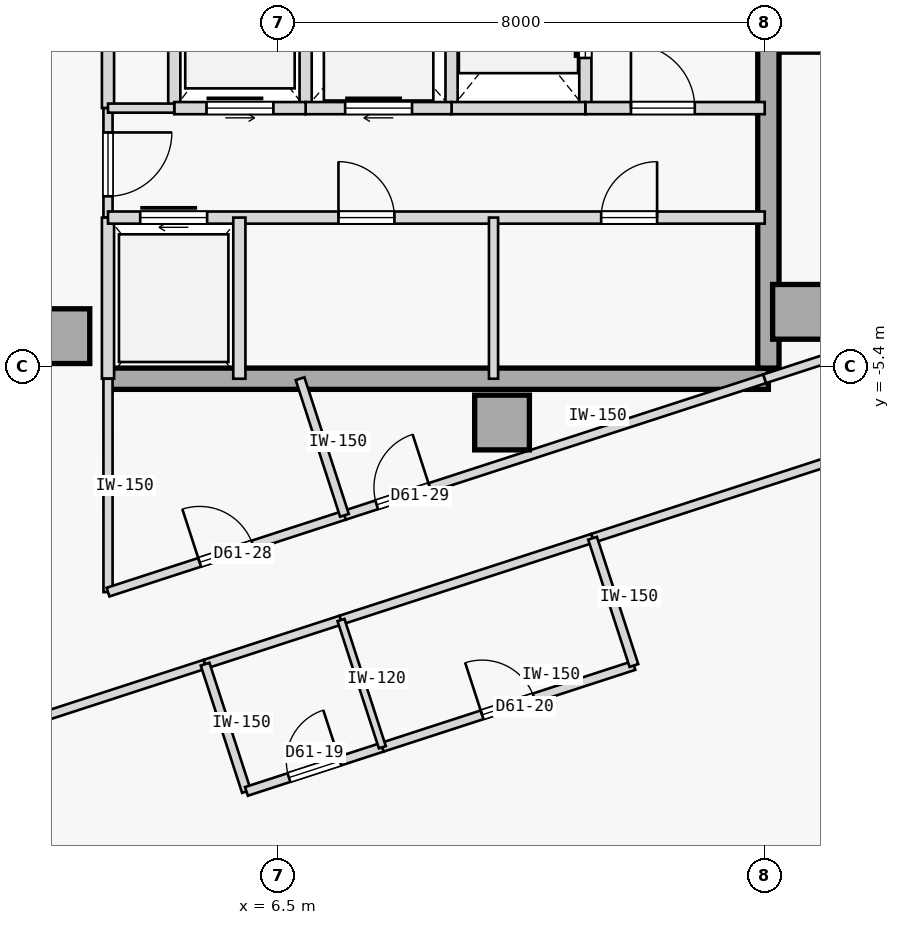
"""IFC4 building model, lengths in metres.
Left out: names, types, materials, properties, quantities, classifications, styles, units other than length and angle.
Written with IfcOpenShell. Run it as: python <this file> out.ifc"""

import sys

from ifc_helpers import new_model, si_unit, direction, frame, frame_2d, origin, origin_2d, place, context, subcontext, project, spatial, rectangle, extrude, element, fill, save


model = new_model("IFC4")
c1 = context("Model", 3, precision=1e-05, world=origin(), true_north=direction((0.0, 1.0)))
c2 = subcontext(c1, "Body", "Model", "MODEL_VIEW")
j1 = project(units=[si_unit("LENGTHUNIT", "METRE"), si_unit("PLANEANGLEUNIT", "RADIAN")], contexts=[c1])
p1 = place(None, origin())
s1 = spatial("IfcSite", under=j1, at=p1, CompositionType="ELEMENT")
p2 = place(p1, origin())
s2 = spatial("IfcBuilding", under=s1, at=p2, CompositionType="ELEMENT")
p3 = place(p2, frame((0.0, 0.0, 231.0)))
s3 = spatial("IfcBuildingStorey", under=s2, at=p3, CompositionType="ELEMENT", Elevation=231.0)
for number, where, z_axis, x_axis in (
    (1, (15.08, -4.5, 0.0), (0.0, 0.0, 1.0), (1.0, 0.0, 0.0)),
    (2, (10.18, -6.32, 0.0), (0.0, 0.0, 1.0), (1.0, 0.0, 0.0)),
    (3, (2.95, -4.9, 0.0), (0.0, 0.0, 1.0), (1.0, 0.0, 0.0)),
):
    element("IfcColumn", number, at=place(p3, frame(where, z_axis=z_axis, x_axis=x_axis)), inside=s3, PredefinedType="COLUMN", context=c2, shape_type="SweptSolid", body=[
        extrude(rectangle(XDim=0.9, YDim=0.9, at=origin_2d()), origin(), (0.0, 0.0, 1.0), 3.35),
    ])
p4 = place(p3, frame((3.7, -5.6, 0.0), z_axis=(0.0, 0.0, 1.0), x_axis=(1.0, 0.0, 0.0)))
e4 = element("IfcWall", 4, at=p4, inside=s3, PredefinedType="SHEAR", context=c2, shape_type="SweptSolid", body=[
    extrude(rectangle(XDim=10.86, YDim=0.35, at=frame_2d((5.43, 0.0))), origin(), (0.0, 0.0, 1.0), 3.125),
])
p5 = place(p3, frame((14.56, -5.425, 0.0), z_axis=(0.0, 0.0, 1.0), x_axis=(0.0, 1.0, 0.0)))
e5 = element("IfcWall", 5, at=p5, inside=s3, PredefinedType="SHEAR", context=c2, shape_type="SweptSolid", body=[
    extrude(rectangle(XDim=10.85, YDim=0.35, at=frame_2d((5.425, 0.0))), origin(), (0.0, 0.0, 1.0), 3.125),
])
p6 = place(p3, frame((3.7, -1.15, 0.0), z_axis=(0.0, 0.0, 1.0), x_axis=(0.0, 1.0, 0.0)))
e6 = element("IfcWall", 6, at=p6, inside=s3, PredefinedType="STANDARD", context=c2, shape_type="SweptSolid", body=[
    extrude(rectangle(XDim=6.75, YDim=0.2, at=frame_2d((3.375, 0.0))), origin(), (0.0, 0.0, 1.0), 3.125),
])
p7 = place(p6, frame((3.6, 0.0, 0.0)))
e7 = element("IfcOpeningElement", 7, at=p7, cuts=e6, PredefinedType="OPENING", context=c2, shape_type="SweptSolid", body=[
    extrude(rectangle(XDim=0.92, YDim=2.15, at=frame_2d((0.46, 1.075))), frame((0.0, 0.11, 0.0), z_axis=(0.0, -1.0, 0.0), x_axis=(1.0, 0.0, 0.0)), (0.0, 0.0, 1.0), 0.22),
])
p8 = place(p3, frame((3.7, -2.95, 0.0), z_axis=(0.0, 0.0, 1.0), x_axis=(0.0, 1.0, 0.0)))
e8 = element("IfcWall", 8, at=p8, inside=s3, PredefinedType="PARTITIONING", context=c2, shape_type="SweptSolid", body=[
    extrude(rectangle(XDim=1.8, YDim=0.15, at=frame_2d((0.9, 0.0))), origin(), (0.0, 0.0, 1.0), 3.125),
])
p9 = place(p8, frame((0.35, 0.0, 0.0)))
e9 = element("IfcOpeningElement", 9, at=p9, cuts=e8, PredefinedType="OPENING", context=c2, shape_type="SweptSolid", body=[
    extrude(rectangle(XDim=1.05, YDim=2.18, at=frame_2d((0.525, 1.09))), frame((0.0, 0.085, 0.0), z_axis=(0.0, -1.0, 0.0), x_axis=(1.0, 0.0, 0.0)), (0.0, 0.0, 1.0), 0.17),
])
p10 = place(p3, frame((3.7, -5.6, 0.0), z_axis=(0.0, 0.0, 1.0), x_axis=(0.0, 1.0, 0.0)))
e10 = element("IfcWall", 10, at=p10, inside=s3, PredefinedType="STANDARD", context=c2, shape_type="SweptSolid", body=[
    extrude(rectangle(XDim=2.65, YDim=0.2, at=frame_2d((1.325, 0.0))), origin(), (0.0, 0.0, 1.0), 3.125),
])
p11 = place(p3, frame((11.55, -1.15, 0.0), z_axis=(0.0, 0.0, 1.0), x_axis=(0.0, 1.0, 0.0)))
e11 = element("IfcWall", 11, at=p11, inside=s3, PredefinedType="STANDARD", context=c2, shape_type="SweptSolid", body=[
    extrude(rectangle(XDim=2.75, YDim=0.2, at=frame_2d((1.375, 0.0))), origin(), (0.0, 0.0, 1.0), 3.125),
])
p12 = place(p11, frame((0.825, 0.0, 0.0)))
e12 = element("IfcOpeningElement", 12, at=p12, cuts=e11, PredefinedType="OPENING", context=c2, shape_type="SweptSolid", body=[
    extrude(rectangle(XDim=1.1, YDim=2.15, at=frame_2d((0.55, 1.075))), frame((0.0, 0.11, 0.0), z_axis=(0.0, -1.0, 0.0), x_axis=(1.0, 0.0, 0.0)), (0.0, 0.0, 1.0), 0.22),
])
p13 = place(p3, frame((9.35, -1.15, 0.0), z_axis=(0.0, 0.0, 1.0), x_axis=(0.0, 1.0, 0.0)))
e13 = element("IfcWall", 13, at=p13, inside=s3, PredefinedType="STANDARD", context=c2, shape_type="SweptSolid", body=[
    extrude(rectangle(XDim=2.75, YDim=0.2, at=frame_2d((1.375, 0.0))), origin(), (0.0, 0.0, 1.0), 3.125),
])
p14 = place(p3, frame((11.55, -1.15, 0.0), z_axis=(0.0, 0.0, 1.0), x_axis=(1.0, 0.0, 0.0)))
e14 = element("IfcWall", 14, at=p14, inside=s3, PredefinedType="STANDARD", context=c2, shape_type="SweptSolid", body=[
    extrude(rectangle(XDim=2.95, YDim=0.2, at=frame_2d((1.475, 0.0))), origin(), (0.0, 0.0, 1.0), 3.125),
])
p15 = place(p14, frame((0.75, 0.0, 0.0)))
e15 = element("IfcOpeningElement", 15, at=p15, cuts=e14, PredefinedType="OPENING", context=c2, shape_type="SweptSolid", body=[
    extrude(rectangle(XDim=1.05, YDim=2.18, at=frame_2d((0.525, 1.09))), frame((0.0, 0.11, 0.0), z_axis=(0.0, -1.0, 0.0), x_axis=(1.0, 0.0, 0.0)), (0.0, 0.0, 1.0), 0.22),
])
p16 = place(p3, frame((9.35, -1.15, 0.0), z_axis=(0.0, 0.0, 1.0), x_axis=(1.0, 0.0, 0.0)))
e16 = element("IfcWall", 16, at=p16, inside=s3, PredefinedType="STANDARD", context=c2, shape_type="SweptSolid", body=[
    extrude(rectangle(XDim=2.2, YDim=0.2, at=frame_2d((1.1, 0.0))), origin(), (0.0, 0.0, 1.0), 3.125),
])
p17 = place(p3, frame((6.95, -1.15, 0.0), z_axis=(0.0, 0.0, 1.0), x_axis=(0.0, 1.0, 0.0)))
e17 = element("IfcWall", 17, at=p17, inside=s3, PredefinedType="STANDARD", context=c2, shape_type="SweptSolid", body=[
    extrude(rectangle(XDim=2.75, YDim=0.2, at=frame_2d((1.375, 0.0))), origin(), (0.0, 0.0, 1.0), 3.125),
])
p18 = place(p3, frame((6.95, -1.15, 0.0), z_axis=(0.0, 0.0, 1.0), x_axis=(1.0, 0.0, 0.0)))
e18 = element("IfcWall", 18, at=p18, inside=s3, PredefinedType="STANDARD", context=c2, shape_type="SweptSolid", body=[
    extrude(rectangle(XDim=2.4, YDim=0.2, at=frame_2d((1.2, 0.0))), origin(), (0.0, 0.0, 1.0), 3.125),
])
p19 = place(p18, frame((0.65, 0.0, 0.0)))
e19 = element("IfcOpeningElement", 19, at=p19, cuts=e18, PredefinedType="OPENING", context=c2, shape_type="SweptSolid", body=[
    extrude(rectangle(XDim=1.1, YDim=2.15, at=frame_2d((0.55, 1.075))), frame((0.0, 0.11, 0.0), z_axis=(0.0, -1.0, 0.0), x_axis=(1.0, 0.0, 0.0)), (0.0, 0.0, 1.0), 0.22),
])
p20 = place(p3, frame((4.79, -1.15, 0.0), z_axis=(0.0, 0.0, 1.0), x_axis=(0.0, 1.0, 0.0)))
e20 = element("IfcWall", 20, at=p20, inside=s3, PredefinedType="STANDARD", context=c2, shape_type="SweptSolid", body=[
    extrude(rectangle(XDim=2.75, YDim=0.2, at=frame_2d((1.375, 0.0))), origin(), (0.0, 0.0, 1.0), 3.125),
])
p21 = place(p3, frame((4.79, -1.15, 0.0), z_axis=(0.0, 0.0, 1.0), x_axis=(1.0, 0.0, 0.0)))
e21 = element("IfcWall", 21, at=p21, inside=s3, PredefinedType="STANDARD", context=c2, shape_type="SweptSolid", body=[
    extrude(rectangle(XDim=2.16, YDim=0.2, at=frame_2d((1.08, 0.0))), origin(), (0.0, 0.0, 1.0), 3.125),
])
p22 = place(p21, frame((0.53, 0.0, 0.0)))
e22 = element("IfcOpeningElement", 22, at=p22, cuts=e21, PredefinedType="OPENING", context=c2, shape_type="SweptSolid", body=[
    extrude(rectangle(XDim=1.1, YDim=2.15, at=frame_2d((0.55, 1.075))), frame((0.0, 0.11, 0.0), z_axis=(0.0, -1.0, 0.0), x_axis=(1.0, 0.0, 0.0)), (0.0, 0.0, 1.0), 0.22),
])
p23 = place(p3, frame((3.7, -1.15, 0.0), z_axis=(0.0, 0.0, 1.0), x_axis=(1.0, 0.0, 0.0)))
e23 = element("IfcWall", 23, at=p23, inside=s3, PredefinedType="PARTITIONING", context=c2, shape_type="SweptSolid", body=[
    extrude(rectangle(XDim=1.09, YDim=0.15, at=frame_2d((0.545, 0.0))), origin(), (0.0, 0.0, 1.0), 3.125),
])
p24 = place(p3, frame((3.7, -2.95, 0.0), z_axis=(0.0, 0.0, 1.0), x_axis=(1.0, 0.0, 0.0)))
e24 = element("IfcWall", 24, at=p24, inside=s3, PredefinedType="STANDARD", context=c2, shape_type="SweptSolid", body=[
    extrude(rectangle(XDim=10.8, YDim=0.2, at=frame_2d((5.4, 0.0))), origin(), (0.0, 0.0, 1.0), 3.125),
])
p25 = place(p24, frame((0.53, 0.0, 0.0)))
e25 = element("IfcOpeningElement", 25, at=p25, cuts=e24, PredefinedType="OPENING", context=c2, shape_type="SweptSolid", body=[
    extrude(rectangle(XDim=1.1, YDim=2.15, at=frame_2d((0.55, 1.075))), frame((0.0, 0.11, 0.0), z_axis=(0.0, -1.0, 0.0), x_axis=(1.0, 0.0, 0.0)), (0.0, 0.0, 1.0), 0.22),
])
p26 = place(p24, frame((3.79, 0.0, 0.0)))
e26 = element("IfcOpeningElement", 26, at=p26, cuts=e24, PredefinedType="OPENING", context=c2, shape_type="SweptSolid", body=[
    extrude(rectangle(XDim=0.92, YDim=2.15, at=frame_2d((0.46, 1.075))), frame((0.0, 0.11, 0.0), z_axis=(0.0, -1.0, 0.0), x_axis=(1.0, 0.0, 0.0)), (0.0, 0.0, 1.0), 0.22),
])
p27 = place(p24, frame((8.11, 0.0, 0.0)))
e27 = element("IfcOpeningElement", 27, at=p27, cuts=e24, PredefinedType="OPENING", context=c2, shape_type="SweptSolid", body=[
    extrude(rectangle(XDim=0.92, YDim=2.15, at=frame_2d((0.46, 1.075))), frame((0.0, 0.11, 0.0), z_axis=(0.0, -1.0, 0.0), x_axis=(1.0, 0.0, 0.0)), (0.0, 0.0, 1.0), 0.22),
])
p28 = place(p3, frame((5.86, -5.6, 0.0), z_axis=(0.0, 0.0, 1.0), x_axis=(0.0, 1.0, 0.0)))
e28 = element("IfcWall", 28, at=p28, inside=s3, PredefinedType="STANDARD", context=c2, shape_type="SweptSolid", body=[
    extrude(rectangle(XDim=2.65, YDim=0.2, at=frame_2d((1.325, 0.0))), origin(), (0.0, 0.0, 1.0), 3.125),
])
p29 = place(p3, frame((10.04, -5.6, 0.0), z_axis=(0.0, 0.0, 1.0), x_axis=(0.0, 1.0, 0.0)))
e29 = element("IfcWall", 29, at=p29, inside=s3, PredefinedType="PARTITIONING", context=c2, shape_type="SweptSolid", body=[
    extrude(rectangle(XDim=2.65, YDim=0.15, at=frame_2d((1.325, 0.0))), origin(), (0.0, 0.0, 1.0), 3.125),
])
p30 = place(p3, frame((-1.643, -12.549, 0.0), z_axis=(0.0, 0.0, 1.0), x_axis=(0.951058161173, 0.309011931914, 0.0)))
e30 = element("IfcWall", 30, at=p30, inside=s3, PredefinedType="PARTITIONING", context=c2, shape_type="SweptSolid", body=[
    extrude(rectangle(XDim=7.297, YDim=0.15, at=frame_2d((3.648, 0.0))), origin(), (0.0, 0.0, 1.0), 3.125),
])
p31 = place(p3, frame((11.669, -8.223, 0.0), z_axis=(0.0, 0.0, 1.0), x_axis=(0.951057967787, 0.309012527106, 0.0)))
e31 = element("IfcWall", 31, at=p31, inside=s3, PredefinedType="PARTITIONING", context=c2, shape_type="SweptSolid", body=[
    extrude(rectangle(XDim=19.291, YDim=0.15, at=frame_2d((9.646, 0.0))), origin(), (0.0, 0.0, 1.0), 3.125),
])
p32 = place(p31, frame((9.17, 0.0, 0.0)))
e32 = element("IfcOpeningElement", 32, at=p32, cuts=e31, PredefinedType="OPENING", context=c2, shape_type="SweptSolid", body=[
    extrude(rectangle(XDim=0.95, YDim=2.15, at=frame_2d((0.475, 1.075))), frame((0.0, 0.085, 0.0), z_axis=(0.0, -1.0, 0.0), x_axis=(1.0, 0.0, 0.0)), (0.0, 0.0, 1.0), 0.17),
])
p33 = place(p3, frame((5.297, -10.294, 0.0), z_axis=(0.0, 0.0, 1.0), x_axis=(0.951066131077, 0.308987401554, 0.0)))
e33 = element("IfcWall", 33, at=p33, inside=s3, PredefinedType="PARTITIONING", context=c2, shape_type="SweptSolid", body=[
    extrude(rectangle(XDim=2.35, YDim=0.15, at=frame_2d((1.175, 0.0))), origin(), (0.0, 0.0, 1.0), 3.125),
])
p34 = place(p3, frame((7.531, -9.568, 0.0), z_axis=(0.0, 0.0, 1.0), x_axis=(0.951041492154, 0.309063230101, 0.0)))
e34 = element("IfcWall", 34, at=p34, inside=s3, PredefinedType="PARTITIONING", context=c2, shape_type="SweptSolid", body=[
    extrude(rectangle(XDim=4.35, YDim=0.15, at=frame_2d((2.175, 0.0))), origin(), (0.0, 0.0, 1.0), 3.125),
])
p35 = place(p3, frame((3.7, -9.109, 0.0), z_axis=(0.0, 0.0, 1.0), x_axis=(-0.000139130433, 0.999999990321, 0.0)))
e35 = element("IfcWall", 35, at=p35, inside=s3, PredefinedType="PARTITIONING", context=c2, shape_type="SweptSolid", body=[
    extrude(rectangle(XDim=3.51, YDim=0.15, at=frame_2d((1.755, 0.0))), origin(), (0.0, 0.0, 1.0), 3.125),
])
p36 = place(p3, frame((3.7, -9.109, 0.0), z_axis=(0.0, 0.0, 1.0), x_axis=(0.95106259184, 0.308998295145, 0.0)))
e36 = element("IfcWall", 36, at=p36, inside=s3, PredefinedType="PARTITIONING", context=c2, shape_type="SweptSolid", body=[
    extrude(rectangle(XDim=4.088, YDim=0.15, at=frame_2d((2.044, 0.0))), origin(), (0.0, 0.0, 1.0), 3.125),
])
p37 = place(p36, frame((1.584, 0.0, 0.0)))
e37 = element("IfcOpeningElement", 37, at=p37, cuts=e36, PredefinedType="OPENING", context=c2, shape_type="SweptSolid", body=[
    extrude(rectangle(XDim=0.92, YDim=2.15, at=frame_2d((0.46, 1.075))), frame((0.0, 0.085, 0.0), z_axis=(0.0, -1.0, 0.0), x_axis=(1.0, 0.0, 0.0)), (0.0, 0.0, 1.0), 0.17),
])
p38 = place(p3, frame((7.588, -7.846, 0.0), z_axis=(0.0, 0.0, 1.0), x_axis=(0.951058013903, 0.309012385174, 0.0)))
e38 = element("IfcWall", 38, at=p38, inside=s3, PredefinedType="PARTITIONING", context=c2, shape_type="SweptSolid", body=[
    extrude(rectangle(XDim=7.267, YDim=0.15, at=frame_2d((3.634, 0.0))), origin(), (0.0, 0.0, 1.0), 3.125),
])
p39 = place(p38, frame((0.557, 0.0, 0.0)))
e39 = element("IfcOpeningElement", 39, at=p39, cuts=e38, PredefinedType="OPENING", context=c2, shape_type="SweptSolid", body=[
    extrude(rectangle(XDim=0.92, YDim=2.15, at=frame_2d((0.46, 1.075))), frame((0.0, 0.085, 0.0), z_axis=(0.0, -1.0, 0.0), x_axis=(1.0, 0.0, 0.0)), (0.0, 0.0, 1.0), 0.17),
])
p40 = place(p3, frame((14.5, -5.6, 0.0), z_axis=(0.0, 0.0, 1.0), x_axis=(0.951047546178, 0.309044600193, 0.0)))
e40 = element("IfcWall", 40, at=p40, inside=s3, PredefinedType="PARTITIONING", context=c2, shape_type="SweptSolid", body=[
    extrude(rectangle(XDim=3.461, YDim=0.15, at=frame_2d((1.73, 0.0))), origin(), (0.0, 0.0, 1.0), 3.125),
])
p41 = place(p40, frame((1.79, 0.0, 0.0)))
e41 = element("IfcOpeningElement", 41, at=p41, cuts=e40, PredefinedType="OPENING", context=c2, shape_type="SweptSolid", body=[
    extrude(rectangle(XDim=0.92, YDim=2.15, at=frame_2d((0.46, 1.075))), frame((0.0, 0.085, 0.0), z_axis=(0.0, -1.0, 0.0), x_axis=(1.0, 0.0, 0.0)), (0.0, 0.0, 1.0), 0.17),
])
p42 = place(p3, frame((5.977, -12.386, 0.0), z_axis=(0.0, 0.0, 1.0), x_axis=(-0.309060979314, 0.951042223598, 0.0)))
e42 = element("IfcWall", 42, at=p42, inside=s3, PredefinedType="PARTITIONING", context=c2, shape_type="SweptSolid", body=[
    extrude(rectangle(XDim=2.2, YDim=0.15, at=frame_2d((1.1, 0.0))), origin(), (0.0, 0.0, 1.0), 3.125),
])
p43 = place(p3, frame((5.977, -12.386, 0.0), z_axis=(0.0, 0.0, 1.0), x_axis=(0.951066131077, 0.308987401554, 0.0)))
e43 = element("IfcWall", 43, at=p43, inside=s3, PredefinedType="PARTITIONING", context=c2, shape_type="SweptSolid", body=[
    extrude(rectangle(XDim=2.35, YDim=0.15, at=frame_2d((1.175, 0.0))), origin(), (0.0, 0.0, 1.0), 3.125),
])
p44 = place(p43, frame((0.735, 0.0, 0.0)))
e44 = element("IfcOpeningElement", 44, at=p44, cuts=e43, PredefinedType="OPENING", context=c2, shape_type="SweptSolid", body=[
    extrude(rectangle(XDim=0.88, YDim=2.15, at=frame_2d((0.44, 1.075))), frame((0.0, 0.085, 0.0), z_axis=(0.0, -1.0, 0.0), x_axis=(1.0, 0.0, 0.0)), (0.0, 0.0, 1.0), 0.17),
])
p45 = place(p3, frame((8.211, -11.66, 0.0), z_axis=(0.0, 0.0, 1.0), x_axis=(0.951057987102, 0.309012467661, 0.0)))
e45 = element("IfcWall", 45, at=p45, inside=s3, PredefinedType="PARTITIONING", context=c2, shape_type="SweptSolid", body=[
    extrude(rectangle(XDim=4.35, YDim=0.15, at=frame_2d((2.175, 0.0))), origin(), (0.0, 0.0, 1.0), 3.125),
])
p46 = place(p45, frame((1.725, 0.0, 0.0)))
e46 = element("IfcOpeningElement", 46, at=p46, cuts=e45, PredefinedType="OPENING", context=c2, shape_type="SweptSolid", body=[
    extrude(rectangle(XDim=0.9, YDim=2.15, at=frame_2d((0.45, 1.075))), frame((0.0, 0.085, 0.0), z_axis=(0.0, -1.0, 0.0), x_axis=(1.0, 0.0, 0.0)), (0.0, 0.0, 1.0), 0.17),
])
p47 = place(p3, frame((12.349, -10.316, 0.0), z_axis=(0.0, 0.0, 1.0), x_axis=(-0.309028364152, 0.951052821956, 0.0)))
e47 = element("IfcWall", 47, at=p47, inside=s3, PredefinedType="PARTITIONING", context=c2, shape_type="SweptSolid", body=[
    extrude(rectangle(XDim=2.2, YDim=0.15, at=frame_2d((1.1, 0.0))), origin(), (0.0, 0.0, 1.0), 3.125),
])
p48 = place(p3, frame((8.211, -11.66, 0.0), z_axis=(0.0, 0.0, 1.0), x_axis=(-0.309060979314, 0.951042223598, 0.0)))
e48 = element("IfcWall", 48, at=p48, inside=s3, PredefinedType="PARTITIONING", context=c2, shape_type="SweptSolid", body=[
    extrude(rectangle(XDim=2.2, YDim=0.12, at=frame_2d((1.1, 0.0))), origin(), (0.0, 0.0, 1.0), 3.125),
])
p49 = place(p3, frame((7.588, -7.846, 0.0), z_axis=(0.0, 0.0, 1.0), x_axis=(-0.309055688452, 0.951043942957, 0.0)))
e49 = element("IfcWall", 49, at=p49, inside=s3, PredefinedType="PARTITIONING", context=c2, shape_type="SweptSolid", body=[
    extrude(rectangle(XDim=2.362, YDim=0.15, at=frame_2d((1.181, 0.0))), origin(), (0.0, 0.0, 1.0), 3.125),
])
p50 = place(p15, origin())
e50 = element("IfcDoor", 50, at=p50, inside=s3, OperationType="SINGLE_SWING_LEFT", PredefinedType="DOOR", context=c2, shape_type="SweptSolid", body=[
    extrude(rectangle(XDim=1.05, YDim=2.18, at=frame_2d((0.525, 1.09))), frame((0.0, 0.025, 0.0), z_axis=(0.0, -1.0, 0.0), x_axis=(1.0, 0.0, 0.0)), (0.0, 0.0, 1.0), 0.05),
])
fill(e15, e50)
p51 = place(p9, frame((1.05, 0.0, 0.0), z_axis=(0.0, 0.0, 1.0), x_axis=(-1.0, 0.0, 0.0)))
e51 = element("IfcDoor", 51, at=p51, inside=s3, OperationType="SINGLE_SWING_RIGHT", PredefinedType="DOOR", context=c2, shape_type="SweptSolid", body=[
    extrude(rectangle(XDim=1.05, YDim=2.18, at=frame_2d((0.525, 1.09))), frame((0.0, 0.025, 0.0), z_axis=(0.0, -1.0, 0.0), x_axis=(1.0, 0.0, 0.0)), (0.0, 0.0, 1.0), 0.05),
])
fill(e9, e51)
p52 = place(p12, origin())
e52 = element("IfcDoor", 52, at=p52, inside=s3, OperationType="SLIDING_TO_RIGHT", PredefinedType="DOOR", context=c2, shape_type="SweptSolid", body=[
    extrude(rectangle(XDim=1.1, YDim=2.15, at=frame_2d((0.55, 1.075))), frame((0.0, 0.025, 0.0), z_axis=(0.0, -1.0, 0.0), x_axis=(1.0, 0.0, 0.0)), (0.0, 0.0, 1.0), 0.05),
])
fill(e12, e52)
p53 = place(p19, origin())
e53 = element("IfcDoor", 53, at=p53, inside=s3, OperationType="SLIDING_TO_RIGHT", PredefinedType="DOOR", context=c2, shape_type="SweptSolid", body=[
    extrude(rectangle(XDim=1.1, YDim=2.15, at=frame_2d((0.55, 1.075))), frame((0.0, 0.025, 0.0), z_axis=(0.0, -1.0, 0.0), x_axis=(1.0, 0.0, 0.0)), (0.0, 0.0, 1.0), 0.05),
])
fill(e19, e53)
p54 = place(p22, origin())
e54 = element("IfcDoor", 54, at=p54, inside=s3, OperationType="SLIDING_TO_LEFT", PredefinedType="DOOR", context=c2, shape_type="SweptSolid", body=[
    extrude(rectangle(XDim=1.1, YDim=2.15, at=frame_2d((0.55, 1.075))), frame((0.0, 0.025, 0.0), z_axis=(0.0, -1.0, 0.0), x_axis=(1.0, 0.0, 0.0)), (0.0, 0.0, 1.0), 0.05),
])
fill(e22, e54)
p55 = place(p25, origin())
e55 = element("IfcDoor", 55, at=p55, inside=s3, OperationType="SLIDING_TO_RIGHT", PredefinedType="DOOR", context=c2, shape_type="SweptSolid", body=[
    extrude(rectangle(XDim=1.1, YDim=2.15, at=frame_2d((0.55, 1.075))), frame((0.0, 0.025, 0.0), z_axis=(0.0, -1.0, 0.0), x_axis=(1.0, 0.0, 0.0)), (0.0, 0.0, 1.0), 0.05),
])
fill(e25, e55)
p56 = place(p26, origin())
e56 = element("IfcDoor", 56, at=p56, inside=s3, OperationType="SINGLE_SWING_LEFT", PredefinedType="DOOR", context=c2, shape_type="SweptSolid", body=[
    extrude(rectangle(XDim=0.92, YDim=2.15, at=frame_2d((0.46, 1.075))), frame((0.0, 0.025, 0.0), z_axis=(0.0, -1.0, 0.0), x_axis=(1.0, 0.0, 0.0)), (0.0, 0.0, 1.0), 0.05),
])
fill(e26, e56)
p57 = place(p27, origin())
e57 = element("IfcDoor", 57, at=p57, inside=s3, OperationType="SINGLE_SWING_RIGHT", PredefinedType="DOOR", context=c2, shape_type="SweptSolid", body=[
    extrude(rectangle(XDim=0.92, YDim=2.15, at=frame_2d((0.46, 1.075))), frame((0.0, 0.025, 0.0), z_axis=(0.0, -1.0, 0.0), x_axis=(1.0, 0.0, 0.0)), (0.0, 0.0, 1.0), 0.05),
])
fill(e27, e57)
p58 = place(p44, origin())
e58 = element("IfcDoor", 58, at=p58, inside=s3, OperationType="SINGLE_SWING_RIGHT", PredefinedType="DOOR", context=c2, shape_type="SweptSolid", body=[
    extrude(rectangle(XDim=0.88, YDim=2.15, at=frame_2d((0.44, 1.075))), frame((0.0, 0.025, 0.0), z_axis=(0.0, -1.0, 0.0), x_axis=(1.0, 0.0, 0.0)), (0.0, 0.0, 1.0), 0.05),
])
fill(e44, e58)
p59 = place(p46, origin())
e59 = element("IfcDoor", 59, at=p59, inside=s3, OperationType="SINGLE_SWING_LEFT", PredefinedType="DOOR", context=c2, shape_type="SweptSolid", body=[
    extrude(rectangle(XDim=0.9, YDim=2.15, at=frame_2d((0.45, 1.075))), frame((0.0, 0.025, 0.0), z_axis=(0.0, -1.0, 0.0), x_axis=(1.0, 0.0, 0.0)), (0.0, 0.0, 1.0), 0.05),
])
fill(e46, e59)
p60 = place(p37, origin())
e60 = element("IfcDoor", 60, at=p60, inside=s3, OperationType="SINGLE_SWING_LEFT", PredefinedType="DOOR", context=c2, shape_type="SweptSolid", body=[
    extrude(rectangle(XDim=0.92, YDim=2.15, at=frame_2d((0.46, 1.075))), frame((0.0, 0.025, 0.0), z_axis=(0.0, -1.0, 0.0), x_axis=(1.0, 0.0, 0.0)), (0.0, 0.0, 1.0), 0.05),
])
fill(e37, e60)
p61 = place(p39, origin())
e61 = element("IfcDoor", 61, at=p61, inside=s3, OperationType="SINGLE_SWING_RIGHT", PredefinedType="DOOR", context=c2, shape_type="SweptSolid", body=[
    extrude(rectangle(XDim=0.92, YDim=2.15, at=frame_2d((0.46, 1.075))), frame((0.0, 0.025, 0.0), z_axis=(0.0, -1.0, 0.0), x_axis=(1.0, 0.0, 0.0)), (0.0, 0.0, 1.0), 0.05),
])
fill(e39, e61)
save(model, sys.argv[1])
